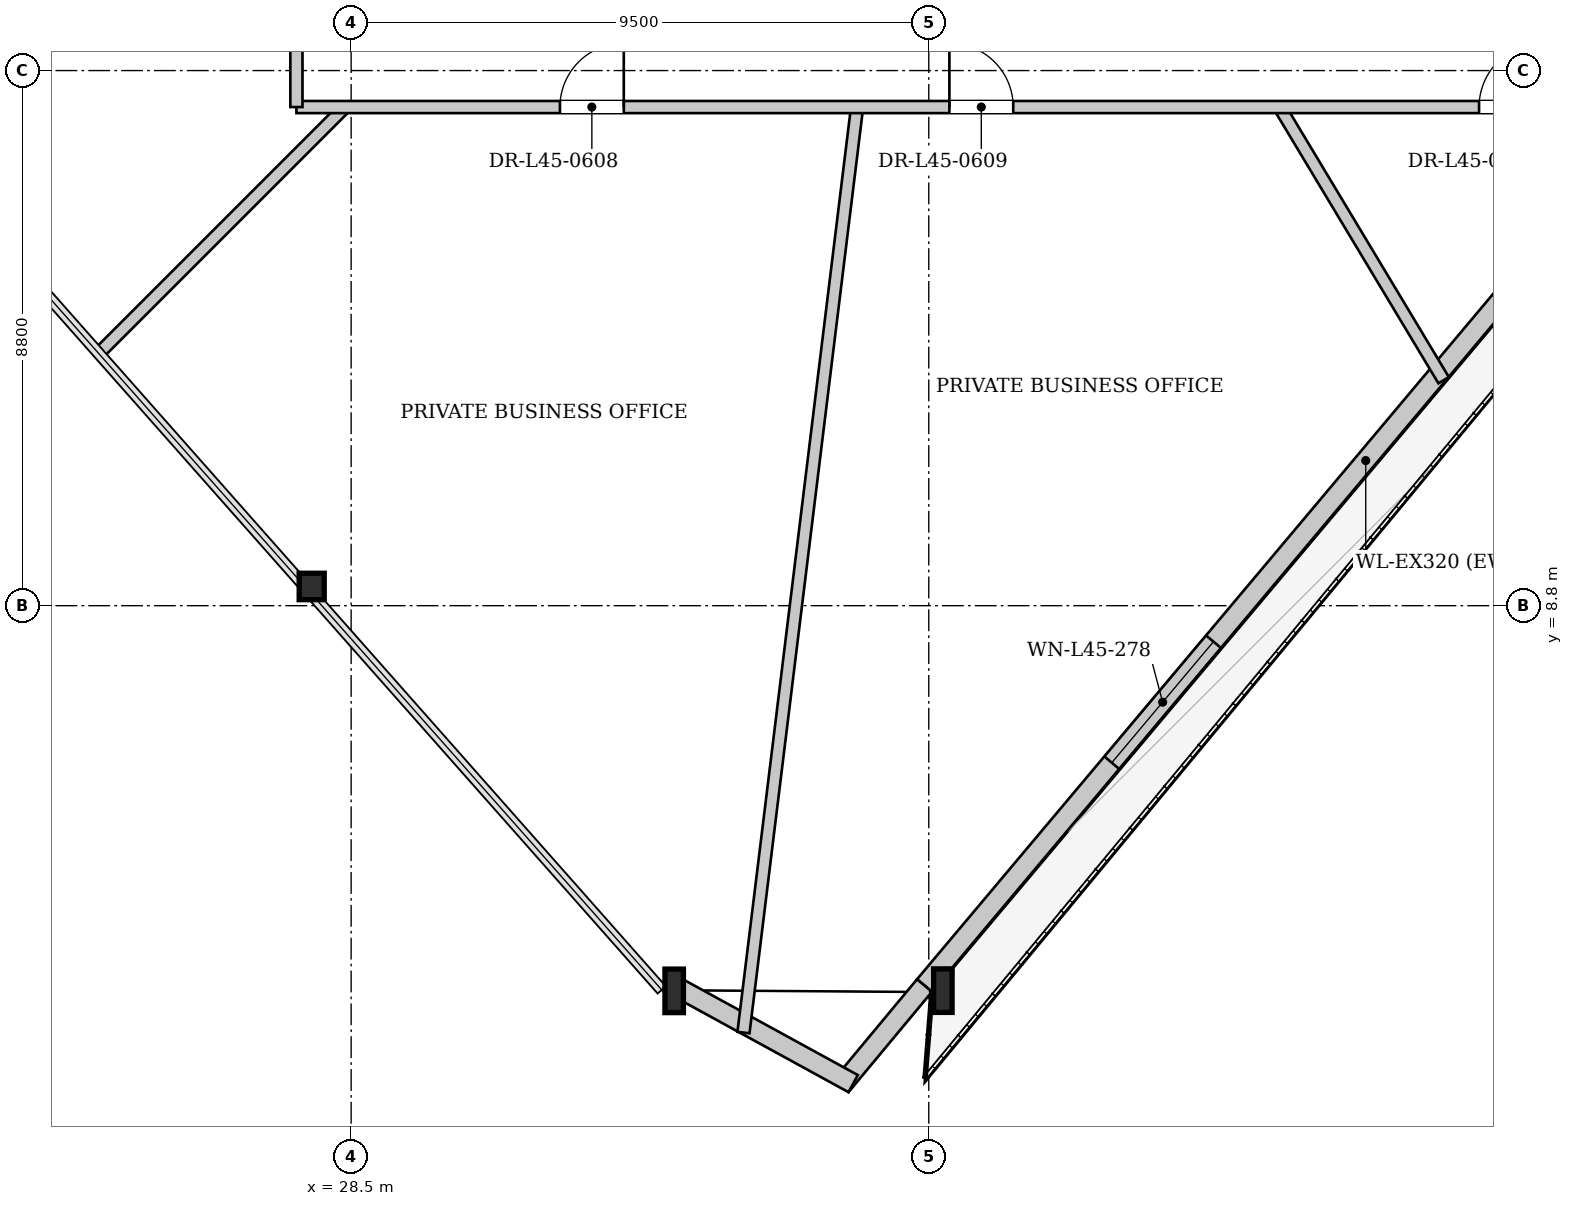
"""IFC4 building model, lengths in metres.
Left out: names, types, materials, properties, quantities, classifications, styles, units other than length and angle.
Written with IfcOpenShell. Run it as: python <this file> out.ifc"""

import sys

from ifc_helpers import new_model, si_unit, direction, frame, frame_2d, origin, origin_2d, place, context, subcontext, project, spatial, rectangle, i_section, extrude, source, transform, mapped, element, fill, save


model = new_model("IFC4")
c1 = context("Model", 3, precision=1e-05, world=origin(), true_north=direction((0.0, 1.0)))
c2 = subcontext(c1, "Body", "Model", "MODEL_VIEW")
j1 = project(units=[si_unit("LENGTHUNIT", "METRE"), si_unit("PLANEANGLEUNIT", "RADIAN")], contexts=[c1])
p1 = place(None, origin())
s1 = spatial("IfcSite", under=j1, at=p1, CompositionType="ELEMENT")
p2 = place(p1, origin())
s2 = spatial("IfcBuilding", under=s1, at=p2, CompositionType="ELEMENT")
p3 = place(p2, frame((0.0, 0.0, 171.45)))
s3 = spatial("IfcBuildingStorey", under=s2, at=p3, CompositionType="ELEMENT", Elevation=171.45)
m1 = source(origin(), c2, "Body", "SweptSolid", [
    extrude(i_section(OverallWidth=0.412, OverallDepth=0.435, WebThickness=0.031, FlangeThickness=0.05, at=origin_2d()), origin(), (0.0, 0.0, 1.0), 3.403),
])
p4 = place(p3, frame((27.687, 9.175, 0.0), z_axis=(0.096780877737, -0.034364744578, 0.994712283042), x_axis=(0.334609979433, 0.94235670617, 0.0)))
e1 = element("IfcColumn", 1, at=p4, inside=s3, PredefinedType="COLUMN", context=c2, shape_type="MappedRepresentation", body=[
    mapped(m1, transform((0.0, 0.0, 0.0), x_axis=(1.0, 0.0, 0.0), y_axis=(0.0, 1.0, 0.0), z_axis=(0.0, 0.0, 1.0), scale=1.0)),
])
m2 = source(origin(), c2, "Body", "SweptSolid", [
    extrude(i_section(OverallWidth=0.304, OverallDepth=0.716, WebThickness=0.021, FlangeThickness=0.04, at=origin_2d()), origin(), (0.0, 0.0, 1.0), 3.41),
])
p5 = place(p3, frame((33.608, 2.482, 0.0), z_axis=(0.120212585637, -0.00952249785, 0.992702501402), x_axis=(0.078966454685, 0.996877273808, 0.0)))
e2 = element("IfcColumn", 2, at=p5, inside=s3, PredefinedType="COLUMN", context=c2, shape_type="MappedRepresentation", body=[
    mapped(m2, transform((0.0, 0.0, 0.0), x_axis=(1.0, 0.0, 0.0), y_axis=(0.0, 1.0, 0.0), z_axis=(0.0, 0.0, 1.0), scale=1.0)),
])
m3 = source(origin(), c2, "Body", "SweptSolid", [
    extrude(i_section(OverallWidth=0.304, OverallDepth=0.716, WebThickness=0.021, FlangeThickness=0.04, at=origin_2d()), origin(), (0.0, 0.0, 1.0), 3.404),
])
p6 = place(p3, frame((38.052, 2.451, 0.0), z_axis=(0.105425268125, 0.01082939829, 0.99436826024), x_axis=(-0.102183402757, 0.994765576506, 0.0)))
e3 = element("IfcColumn", 3, at=p6, inside=s3, PredefinedType="COLUMN", context=c2, shape_type="MappedRepresentation", body=[
    mapped(m3, transform((0.0, 0.0, 0.0), x_axis=(1.0, 0.0, 0.0), y_axis=(0.0, 1.0, 0.0), z_axis=(0.0, 0.0, 1.0), scale=1.0)),
])
p7 = place(p3, frame((52.993, 20.473, 0.0), z_axis=(0.0, 0.0, 1.0), x_axis=(-0.643470383852, -0.765471008664, 0.0)))
e4 = element("IfcWall", 4, at=p7, inside=s3, PredefinedType="SOLIDWALL", context=c2, shape_type="SweptSolid", body=[
    extrude(rectangle(XDim=23.409, YDim=0.32, at=frame_2d((11.705, 0.0))), origin(), (0.0, 0.0, 1.0), 2.722),
])
p8 = place(p7, frame((6.741, 0.0, 0.0)))
e5 = element("IfcOpeningElement", 5, at=p8, cuts=e4, PredefinedType="OPENING", context=c2, shape_type="SweptSolid", body=[
    extrude(rectangle(XDim=1.5, YDim=2.3, at=frame_2d((0.75, 1.15))), frame((0.0, 0.17, 0.0), z_axis=(0.0, -1.0, 0.0), x_axis=(1.0, 0.0, 0.0)), (0.0, 0.0, 1.0), 0.34),
])
p9 = place(p7, frame((16.023, 0.0, 0.252)))
e6 = element("IfcOpeningElement", 6, at=p9, cuts=e4, PredefinedType="OPENING", context=c2, shape_type="SweptSolid", body=[
    extrude(rectangle(XDim=2.6, YDim=2.35, at=frame_2d((1.3, 1.175))), frame((0.0, 0.17, 0.0), z_axis=(0.0, -1.0, 0.0), x_axis=(1.0, 0.0, 0.0)), (0.0, 0.0, 1.0), 0.34),
])
p10 = place(p3, frame((37.929, 2.553, 0.0), z_axis=(0.0, 0.0, 1.0), x_axis=(-0.639311542503, -0.768947821132, 0.0)))
e7 = element("IfcWall", 7, at=p10, inside=s3, PredefinedType="SOLIDWALL", context=c2, shape_type="SweptSolid", body=[
    extrude(rectangle(XDim=2.147, YDim=0.32, at=frame_2d((1.073, 0.0))), origin(), (0.0, 0.0, 1.0), 2.722),
])
p11 = place(p3, frame((36.757, 0.94, 0.0), z_axis=(0.0, 0.0, 1.0), x_axis=(-0.877100463221, 0.480306961659, 0.0)))
e8 = element("IfcWall", 8, at=p11, inside=s3, PredefinedType="SOLIDWALL", context=c2, shape_type="SweptSolid", body=[
    extrude(rectangle(XDim=3.502, YDim=0.32, at=frame_2d((1.751, 0.0))), origin(), (0.0, 0.0, 1.0), 2.722),
])
p12 = place(p3, frame((28.4, 17.0, 0.0), z_axis=(0.0, 0.0, 1.0), x_axis=(-0.707085365714, -0.707128196011, 0.0)))
e9 = element("IfcWall", 9, at=p12, inside=s3, PredefinedType="PARTITIONING", context=c2, shape_type="SweptSolid", body=[
    extrude(rectangle(XDim=5.7, YDim=0.2, at=frame_2d((2.85, 0.0))), origin(), (0.0, 0.0, 1.0), 3.33),
])
p13 = place(p3, frame((36.821, 17.0, 0.0), z_axis=(0.0, 0.0, 1.0), x_axis=(-0.121875066748, -0.992545448886, 0.0)))
e10 = element("IfcWall", 10, at=p13, inside=s3, PredefinedType="PARTITIONING", context=c2, shape_type="SweptSolid", body=[
    extrude(rectangle(XDim=15.334, YDim=0.2, at=frame_2d((7.667, 0.0))), origin(), (0.0, 0.0, 1.0), 3.33),
])
p14 = place(p3, frame((43.768, 17.0, 0.0), z_axis=(0.0, 0.0, 1.0), x_axis=(0.515030046978, -0.857172124319, 0.0)))
e11 = element("IfcWall", 11, at=p14, inside=s3, PredefinedType="PARTITIONING", context=c2, shape_type="SweptSolid", body=[
    extrude(rectangle(XDim=5.24, YDim=0.2, at=frame_2d((2.62, 0.0))), origin(), (0.0, 0.0, 1.0), 3.33),
])
p15 = place(p3, frame((27.6, 17.0, 0.0), z_axis=(0.0, 0.0, 1.0), x_axis=(1.0, 0.0, 0.0)))
e12 = element("IfcWall", 12, at=p15, inside=s3, PredefinedType="PARTITIONING", context=c2, shape_type="SweptSolid", body=[
    extrude(rectangle(XDim=20.8, YDim=0.2, at=frame_2d((10.4, 0.0))), origin(), (0.0, 0.0, 1.0), 3.33),
])
p16 = place(p15, frame((4.334, 0.0, 0.0)))
e13 = element("IfcOpeningElement", 13, at=p16, cuts=e12, PredefinedType="OPENING", context=c2, shape_type="SweptSolid", body=[
    extrude(rectangle(XDim=1.05, YDim=2.2, at=frame_2d((0.525, 1.1))), frame((0.0, 0.11, 0.0), z_axis=(0.0, -1.0, 0.0), x_axis=(1.0, 0.0, 0.0)), (0.0, 0.0, 1.0), 0.22),
])
p17 = place(p15, frame((10.739, 0.0, 0.0)))
e14 = element("IfcOpeningElement", 14, at=p17, cuts=e12, PredefinedType="OPENING", context=c2, shape_type="SweptSolid", body=[
    extrude(rectangle(XDim=1.05, YDim=2.2, at=frame_2d((0.525, 1.1))), frame((0.0, 0.11, 0.0), z_axis=(0.0, -1.0, 0.0), x_axis=(1.0, 0.0, 0.0)), (0.0, 0.0, 1.0), 0.22),
])
p18 = place(p15, frame((19.45, 0.0, 0.0)))
e15 = element("IfcOpeningElement", 15, at=p18, cuts=e12, PredefinedType="OPENING", context=c2, shape_type="SweptSolid", body=[
    extrude(rectangle(XDim=1.05, YDim=2.2, at=frame_2d((0.525, 1.1))), frame((0.0, 0.11, 0.0), z_axis=(0.0, -1.0, 0.0), x_axis=(1.0, 0.0, 0.0)), (0.0, 0.0, 1.0), 0.22),
])
p19 = place(p3, frame((27.6, 17.0, 0.0), z_axis=(0.0, 0.0, 1.0), x_axis=(0.0, 1.0, 0.0)))
e16 = element("IfcWall", 16, at=p19, inside=s3, PredefinedType="PARTITIONING", context=c2, shape_type="SweptSolid", body=[
    extrude(rectangle(XDim=19.2, YDim=0.2, at=frame_2d((9.6, 0.0))), origin(), (0.0, 0.0, 1.0), 3.33),
])
p20 = place(p19, frame((11.311, 0.0, 0.0)))
e17 = element("IfcOpeningElement", 17, at=p20, cuts=e16, PredefinedType="OPENING", context=c2, shape_type="SweptSolid", body=[
    extrude(rectangle(XDim=1.05, YDim=2.2, at=frame_2d((0.525, 1.1))), frame((0.0, 0.11, 0.0), z_axis=(0.0, -1.0, 0.0), x_axis=(1.0, 0.0, 0.0)), (0.0, 0.0, 1.0), 0.22),
])
p21 = place(p19, frame((3.087, 0.0, 0.0)))
e18 = element("IfcOpeningElement", 18, at=p21, cuts=e16, PredefinedType="OPENING", context=c2, shape_type="SweptSolid", body=[
    extrude(rectangle(XDim=1.05, YDim=2.2, at=frame_2d((0.525, 1.1))), frame((0.0, 0.11, 0.0), z_axis=(0.0, -1.0, 0.0), x_axis=(1.0, 0.0, 0.0)), (0.0, 0.0, 1.0), 0.22),
])
p22 = place(p19, frame((17.85, 0.0, 0.0)))
e19 = element("IfcOpeningElement", 19, at=p22, cuts=e16, PredefinedType="OPENING", context=c2, shape_type="SweptSolid", body=[
    extrude(rectangle(XDim=1.05, YDim=2.2, at=frame_2d((0.525, 1.1))), frame((0.0, 0.11, 0.0), z_axis=(0.0, -1.0, 0.0), x_axis=(1.0, 0.0, 0.0)), (0.0, 0.0, 1.0), 0.22),
])
m4 = source(origin(), c2, "Body", "SweptSolid", [
    extrude(rectangle(XDim=2.6, YDim=2.35, at=frame_2d((1.3, 1.175))), frame((0.0, 0.03, 0.0), z_axis=(0.0, -1.0, 0.0), x_axis=(1.0, 0.0, 0.0)), (0.0, 0.0, 1.0), 0.06),
])
p23 = place(p9, origin())
e20 = element("IfcWindow", 20, at=p23, inside=s3, PartitioningType="SINGLE_PANEL", PredefinedType="WINDOW", context=c2, shape_type="MappedRepresentation", body=[
    mapped(m4, transform((0.0, 0.0, 0.0), x_axis=(1.0, 0.0, 0.0), y_axis=(0.0, 1.0, 0.0), z_axis=(0.0, 0.0, 1.0), scale=1.0)),
])
fill(e6, e20)
m5 = source(origin(), c2, "Body", "SweptSolid", [
    extrude(rectangle(XDim=1.05, YDim=2.2, at=frame_2d((0.525, 1.1))), frame((0.0, 0.025, 0.0), z_axis=(0.0, -1.0, 0.0), x_axis=(1.0, 0.0, 0.0)), (0.0, 0.0, 1.0), 0.05),
])
p24 = place(p16, origin())
e21 = element("IfcDoor", 21, at=p24, inside=s3, OperationType="SINGLE_SWING_RIGHT", PredefinedType="DOOR", context=c2, shape_type="MappedRepresentation", body=[
    mapped(m5, transform((0.0, 0.0, 0.0), x_axis=(1.0, 0.0, 0.0), y_axis=(0.0, 1.0, 0.0), z_axis=(0.0, 0.0, 1.0), scale=1.0)),
])
fill(e13, e21)
p25 = place(p17, origin())
e22 = element("IfcDoor", 22, at=p25, inside=s3, OperationType="SINGLE_SWING_LEFT", PredefinedType="DOOR", context=c2, shape_type="MappedRepresentation", body=[
    mapped(m5, transform((0.0, 0.0, 0.0), x_axis=(1.0, 0.0, 0.0), y_axis=(0.0, 1.0, 0.0), z_axis=(0.0, 0.0, 1.0), scale=1.0)),
])
fill(e14, e22)
p26 = place(p18, origin())
e23 = element("IfcDoor", 23, at=p26, inside=s3, OperationType="SINGLE_SWING_RIGHT", PredefinedType="DOOR", context=c2, shape_type="MappedRepresentation", body=[
    mapped(m5, transform((0.0, 0.0, 0.0), x_axis=(1.0, 0.0, 0.0), y_axis=(0.0, 1.0, 0.0), z_axis=(0.0, 0.0, 1.0), scale=1.0)),
])
fill(e15, e23)
save(model, sys.argv[1])
